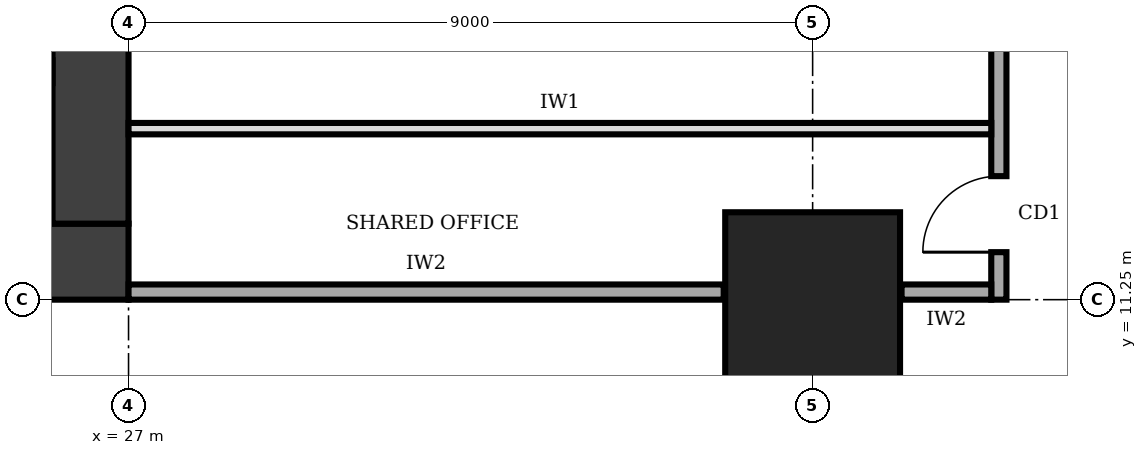
"""IFC4 building model, lengths in metres.
Left out: names, types, materials, properties, quantities, classifications, styles, units other than length and angle.
Written with IfcOpenShell. Run it as: python <this file> out.ifc"""

import sys

from ifc_helpers import new_model, si_unit, direction, frame, frame_2d, origin, origin_2d, place, context, subcontext, project, spatial, rectangle, extrude, element, fill, save


model = new_model("IFC4")
c1 = context("Model", 3, precision=1e-05, world=origin(), true_north=direction((0.0, 1.0)))
c2 = subcontext(c1, "Body", "Model", "MODEL_VIEW")
j1 = project(units=[si_unit("LENGTHUNIT", "METRE"), si_unit("PLANEANGLEUNIT", "RADIAN")], contexts=[c1])
p1 = place(None, origin())
s1 = spatial("IfcSite", under=j1, at=p1, CompositionType="ELEMENT")
p2 = place(p1, origin())
s2 = spatial("IfcBuilding", under=s1, at=p2, CompositionType="ELEMENT")
p3 = place(p2, frame((0.0, 0.0, 89.0)))
s3 = spatial("IfcBuildingStorey", under=s2, at=p3, CompositionType="ELEMENT", Elevation=89.0)
p4 = place(p3, frame((13.5, 11.75, 0.0), z_axis=(0.0, 0.0, 1.0), x_axis=(1.0, 0.0, 0.0)))
e1 = element("IfcWall", 1, at=p4, inside=s3, PredefinedType="SHEAR", context=c2, shape_type="SweptSolid", body=[
    extrude(rectangle(XDim=13.5, YDim=1.0, at=frame_2d((6.75, 0.0))), origin(), (0.0, 0.0, 1.0), 4.0),
])
p5 = place(p4, frame((4.75, 0.0, 0.0)))
e2 = element("IfcOpeningElement", 2, at=p5, cuts=e1, PredefinedType="OPENING", context=c2, shape_type="SweptSolid", body=[
    extrude(rectangle(XDim=1.0, YDim=2.1, at=frame_2d((0.5, 1.05))), frame((0.0, 0.51, 0.0), z_axis=(0.0, -1.0, 0.0), x_axis=(1.0, 0.0, 0.0)), (0.0, 0.0, 1.0), 1.02),
])
p6 = place(p3, frame((26.5, 12.25, 0.0), z_axis=(0.0, 0.0, 1.0), x_axis=(0.0, 1.0, 0.0)))
e3 = element("IfcWall", 3, at=p6, inside=s3, PredefinedType="SHEAR", context=c2, shape_type="SweptSolid", body=[
    extrude(rectangle(XDim=16.0, YDim=1.0, at=frame_2d((8.0, 0.0))), origin(), (0.0, 0.0, 1.0), 4.0),
])
p7 = place(p3, frame((36.0, 11.25, 0.0), z_axis=(0.0, 0.0, 1.0), x_axis=(1.0, 0.0, 0.0)))
e4 = element("IfcColumn", 4, at=p7, inside=s3, PredefinedType="COLUMN", context=c2, shape_type="SweptSolid", body=[
    extrude(rectangle(XDim=2.3, YDim=2.3, at=origin_2d()), origin(), (0.0, 0.0, 1.0), 4.0),
])
p8 = place(p3, frame((38.45, 11.25, 0.0), z_axis=(0.0, 0.0, 1.0), x_axis=(0.0, 1.0, 0.0)))
e5 = element("IfcWall", 5, at=p8, inside=s3, PredefinedType="SOLIDWALL", context=c2, shape_type="SweptSolid", body=[
    extrude(rectangle(XDim=18.0, YDim=0.2, at=frame_2d((9.0, 0.0))), origin(), (0.0, 0.0, 1.0), 3.75),
])
p9 = place(p8, frame((0.625, 0.0, 0.0)))
e6 = element("IfcOpeningElement", 6, at=p9, cuts=e5, PredefinedType="OPENING", context=c2, shape_type="SweptSolid", body=[
    extrude(rectangle(XDim=1.0, YDim=2.1, at=frame_2d((0.5, 1.05))), frame((0.0, 0.11, 0.0), z_axis=(0.0, -1.0, 0.0), x_axis=(1.0, 0.0, 0.0)), (0.0, 0.0, 1.0), 0.22),
])
p10 = place(p8, frame((4.0, 0.0, 0.0)))
e7 = element("IfcOpeningElement", 7, at=p10, cuts=e5, PredefinedType="OPENING", context=c2, shape_type="SweptSolid", body=[
    extrude(rectangle(XDim=1.0, YDim=2.1, at=frame_2d((0.5, 1.05))), frame((0.0, 0.11, 0.0), z_axis=(0.0, -1.0, 0.0), x_axis=(1.0, 0.0, 0.0)), (0.0, 0.0, 1.0), 0.22),
])
p11 = place(p8, frame((6.9, 0.0, 0.0)))
e8 = element("IfcOpeningElement", 8, at=p11, cuts=e5, PredefinedType="OPENING", context=c2, shape_type="SweptSolid", body=[
    extrude(rectangle(XDim=1.0, YDim=2.1, at=frame_2d((0.5, 1.05))), frame((0.0, 0.11, 0.0), z_axis=(0.0, -1.0, 0.0), x_axis=(1.0, 0.0, 0.0)), (0.0, 0.0, 1.0), 0.22),
])
p12 = place(p8, frame((13.0, 0.0, 0.0)))
e9 = element("IfcOpeningElement", 9, at=p12, cuts=e5, PredefinedType="OPENING", context=c2, shape_type="SweptSolid", body=[
    extrude(rectangle(XDim=1.0, YDim=2.1, at=frame_2d((0.5, 1.05))), frame((0.0, 0.11, 0.0), z_axis=(0.0, -1.0, 0.0), x_axis=(1.0, 0.0, 0.0)), (0.0, 0.0, 1.0), 0.22),
])
p13 = place(p8, frame((16.375, 0.0, 0.0)))
e10 = element("IfcOpeningElement", 10, at=p13, cuts=e5, PredefinedType="OPENING", context=c2, shape_type="SweptSolid", body=[
    extrude(rectangle(XDim=1.0, YDim=2.1, at=frame_2d((0.5, 1.05))), frame((0.0, 0.11, 0.0), z_axis=(0.0, -1.0, 0.0), x_axis=(1.0, 0.0, 0.0)), (0.0, 0.0, 1.0), 0.22),
])
p14 = place(p3, frame((27.0, 11.35, 0.0), z_axis=(0.0, 0.0, 1.0), x_axis=(1.0, 0.0, 0.0)))
e11 = element("IfcWall", 11, at=p14, inside=s3, PredefinedType="SOLIDWALL", context=c2, shape_type="SweptSolid", body=[
    extrude(rectangle(XDim=7.83, YDim=0.2, at=frame_2d((3.915, 0.0))), origin(), (0.0, 0.0, 1.0), 2.85),
])
p15 = place(p3, frame((37.17, 11.35, 0.0), z_axis=(0.0, 0.0, 1.0), x_axis=(1.0, 0.0, 0.0)))
e12 = element("IfcWall", 12, at=p15, inside=s3, PredefinedType="SOLIDWALL", context=c2, shape_type="SweptSolid", body=[
    extrude(rectangle(XDim=1.18, YDim=0.2, at=frame_2d((0.59, 0.0))), origin(), (0.0, 0.0, 1.0), 2.85),
])
p16 = place(p3, frame((27.0, 13.5, 0.0), z_axis=(0.0, 0.0, 1.0), x_axis=(1.0, 0.0, 0.0)))
e13 = element("IfcWall", 13, at=p16, inside=s3, PredefinedType="PARTITIONING", context=c2, shape_type="SweptSolid", body=[
    extrude(rectangle(XDim=11.35, YDim=0.15, at=frame_2d((5.675, 0.0))), origin(), (0.0, 0.0, 1.0), 3.75),
])
p17 = place(p9, origin())
e14 = element("IfcDoor", 14, at=p17, inside=s3, OperationType="SINGLE_SWING_LEFT", PredefinedType="DOOR", context=c2, shape_type="SweptSolid", body=[
    extrude(rectangle(XDim=1.0, YDim=2.1, at=frame_2d((0.5, 1.05))), frame((0.0, 0.025, 0.0), z_axis=(0.0, -1.0, 0.0), x_axis=(1.0, 0.0, 0.0)), (0.0, 0.0, 1.0), 0.05),
])
fill(e6, e14)
save(model, sys.argv[1])
